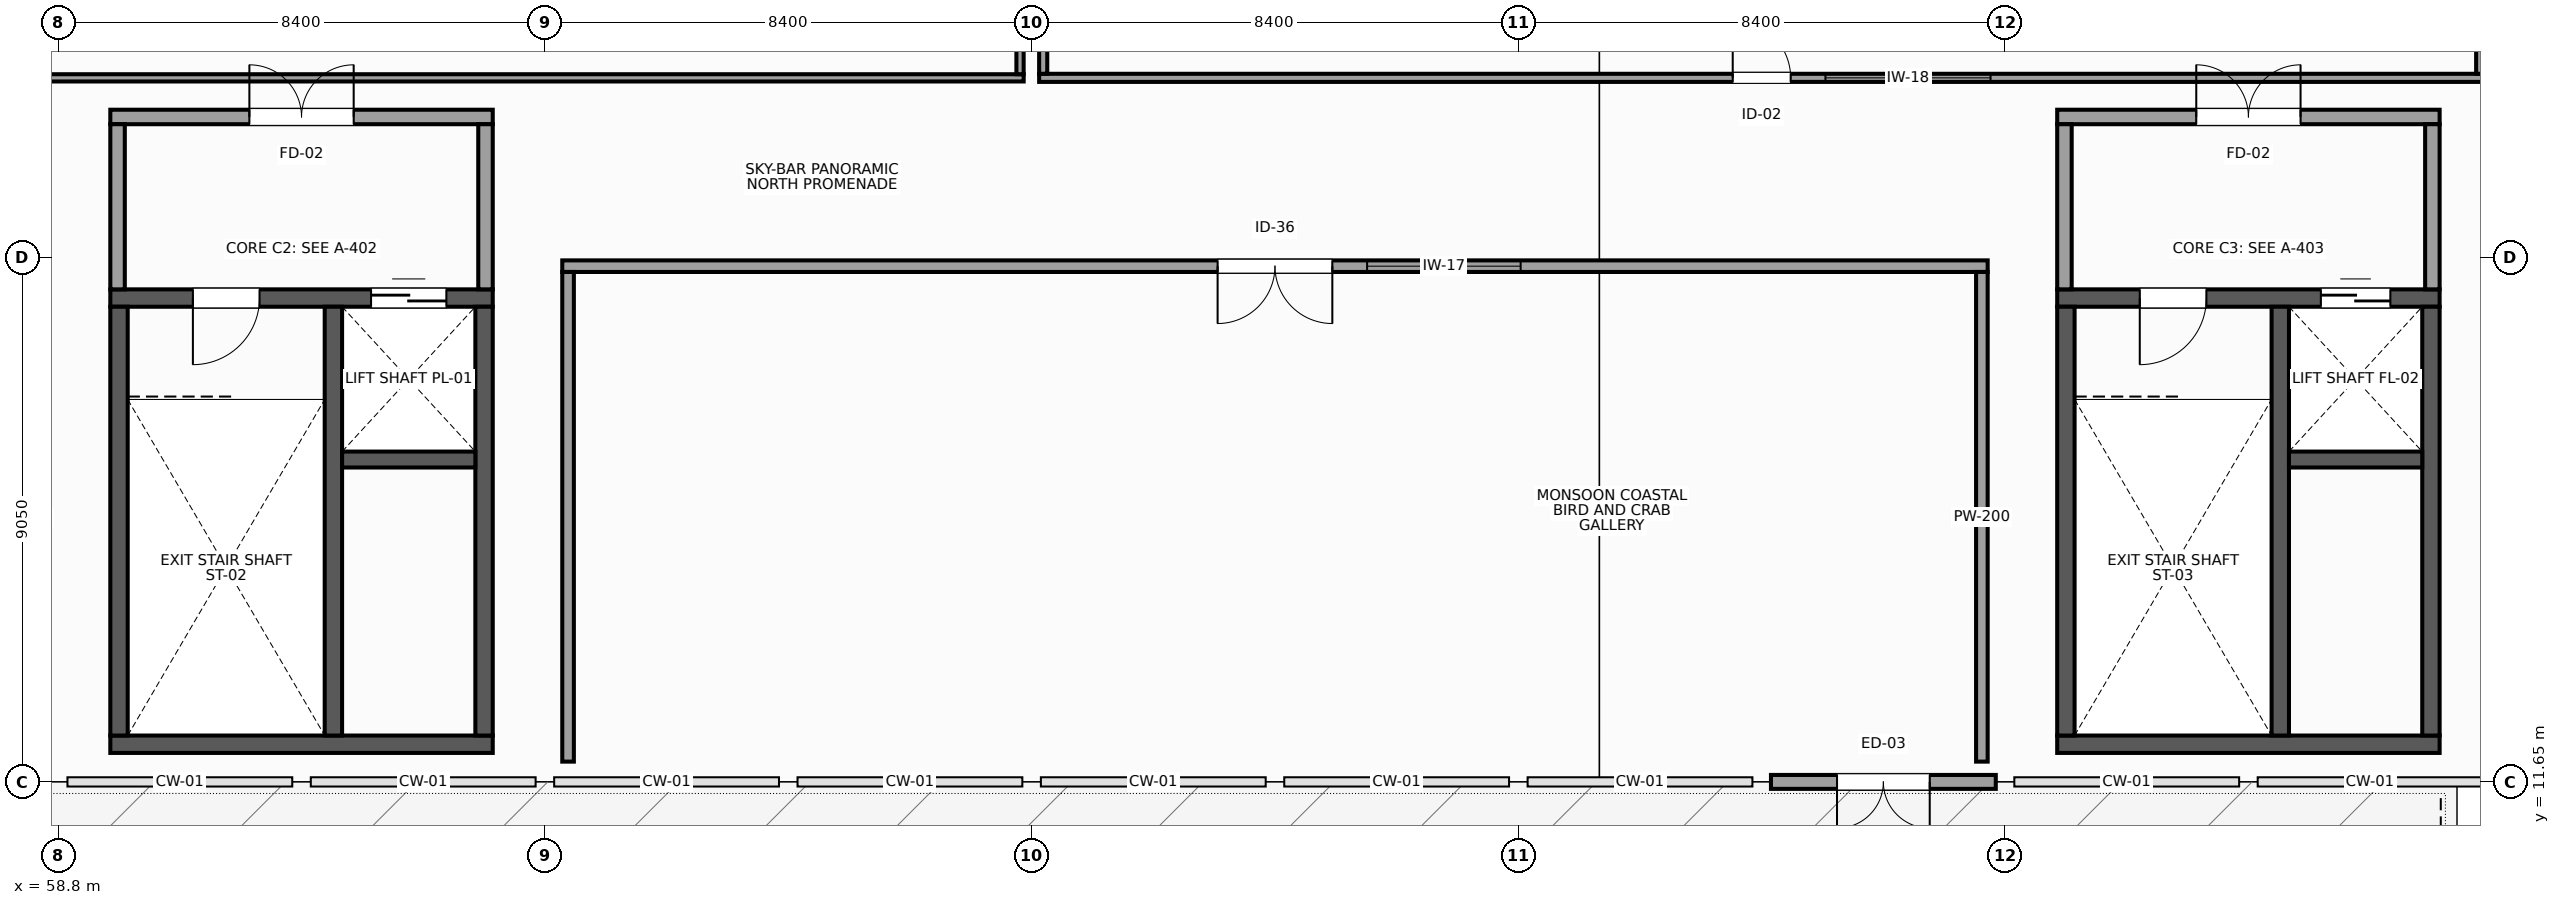
"""IFC4 building model, lengths in metres.
Left out: names, types, materials, properties, quantities, classifications, styles, units other than length and angle.
Written with IfcOpenShell. Run it as: python <this file> out.ifc"""

import sys

from ifc_helpers import new_model, si_unit, direction, frame, frame_2d, origin, origin_2d, place, context, subcontext, project, spatial, rectangle, extrude, element, fill, save


model = new_model("IFC4")
c1 = context("Model", 3, precision=1e-05, world=origin(), true_north=direction((0.0, 1.0)))
c2 = subcontext(c1, "Body", "Model", "MODEL_VIEW")
j1 = project(units=[si_unit("LENGTHUNIT", "METRE"), si_unit("PLANEANGLEUNIT", "RADIAN")], contexts=[c1])
p1 = place(None, origin())
s1 = spatial("IfcSite", under=j1, at=p1, CompositionType="ELEMENT")
p2 = place(p1, origin())
s2 = spatial("IfcBuilding", under=s1, at=p2, CompositionType="ELEMENT")
p3 = place(p2, frame((0.0, 0.0, 24.6)))
s3 = spatial("IfcBuildingStorey", under=s2, at=p3, CompositionType="ELEMENT", Elevation=24.6)
p4 = place(p3, frame((88.36, 11.65, 0.0), z_axis=(0.0, 0.0, 1.0), x_axis=(1.0, 0.0, 0.0)))
e1 = element("IfcWall", 1, at=p4, inside=s3, PredefinedType="STANDARD", context=c2, shape_type="SweptSolid", body=[
    extrude(rectangle(XDim=3.88, YDim=0.24, at=frame_2d((1.94, 0.0))), origin(), (0.0, 0.0, 1.0), 4.78),
])
p5 = place(p4, frame((1.14, 0.0, 0.0)))
e2 = element("IfcOpeningElement", 2, at=p5, cuts=e1, PredefinedType="OPENING", context=c2, shape_type="SweptSolid", body=[
    extrude(rectangle(XDim=1.6, YDim=2.25, at=frame_2d((0.8, 1.125))), frame((0.0, 0.13, 0.0), z_axis=(0.0, -1.0, 0.0), x_axis=(1.0, 0.0, 0.0)), (0.0, 0.0, 1.0), 0.26),
])
p6 = place(p3, frame((59.7, 12.3, 0.0), z_axis=(0.0, 0.0, 1.0), x_axis=(1.0, 0.0, 0.0)))
e3 = element("IfcWall", 3, at=p6, inside=s3, PredefinedType="SHEAR", context=c2, shape_type="SweptSolid", body=[
    extrude(rectangle(XDim=6.6, YDim=0.3, at=frame_2d((3.3, 0.0))), origin(), (0.0, 0.0, 1.0), 5.18),
])
p7 = place(p3, frame((59.7, 20.0, 0.0), z_axis=(0.0, 0.0, 1.0), x_axis=(1.0, 0.0, 0.0)))
e4 = element("IfcWall", 4, at=p7, inside=s3, PredefinedType="SHEAR", context=c2, shape_type="SweptSolid", body=[
    extrude(rectangle(XDim=6.6, YDim=0.3, at=frame_2d((3.3, 0.0))), origin(), (0.0, 0.0, 1.0), 5.18),
])
p8 = place(p7, frame((1.425, 0.0, 0.0)))
e5 = element("IfcOpeningElement", 5, at=p8, cuts=e4, PredefinedType="OPENING", context=c2, shape_type="SweptSolid", body=[
    extrude(rectangle(XDim=1.15, YDim=2.2, at=frame_2d((0.575, 1.1))), frame((0.0, 0.16, 0.0), z_axis=(0.0, -1.0, 0.0), x_axis=(1.0, 0.0, 0.0)), (0.0, 0.0, 1.0), 0.32),
])
p9 = place(p7, frame((4.5, 0.0, 0.0)))
e6 = element("IfcOpeningElement", 6, at=p9, cuts=e4, PredefinedType="OPENING", context=c2, shape_type="SweptSolid", body=[
    extrude(rectangle(XDim=1.3, YDim=2.2, at=frame_2d((0.65, 1.1))), frame((0.0, 0.16, 0.0), z_axis=(0.0, -1.0, 0.0), x_axis=(1.0, 0.0, 0.0)), (0.0, 0.0, 1.0), 0.32),
])
for number, where, z_axis, x_axis in (
    (7, (59.85, 12.45, 0.0), (0.0, 0.0, 1.0), (0.0, 1.0, 0.0)),
    (8, (66.15, 12.45, 0.0), (0.0, 0.0, 1.0), (0.0, 1.0, 0.0)),
    (9, (63.55, 12.45, 0.0), (0.0, 0.0, 1.0), (0.0, 1.0, 0.0)),
):
    element("IfcWall", number, at=place(p3, frame(where, z_axis=z_axis, x_axis=x_axis)), inside=s3, PredefinedType="SHEAR", context=c2, shape_type="SweptSolid", body=[
        extrude(rectangle(XDim=7.4, YDim=0.3, at=frame_2d((3.7, 0.0))), origin(), (0.0, 0.0, 1.0), 5.18),
    ])
p10 = place(p3, frame((63.7, 17.213, 0.0), z_axis=(0.0, 0.0, 1.0), x_axis=(1.0, 0.0, 0.0)))
e10 = element("IfcWall", 10, at=p10, inside=s3, PredefinedType="SHEAR", context=c2, shape_type="SweptSolid", body=[
    extrude(rectangle(XDim=2.3, YDim=0.275, at=frame_2d((1.15, 0.0))), origin(), (0.0, 0.0, 1.0), 5.18),
])
p11 = place(p3, frame((59.7, 23.125, 0.0), z_axis=(0.0, 0.0, 1.0), x_axis=(1.0, 0.0, 0.0)))
e11 = element("IfcWall", 11, at=p11, inside=s3, PredefinedType="PARTITIONING", context=c2, shape_type="SweptSolid", body=[
    extrude(rectangle(XDim=6.6, YDim=0.25, at=frame_2d((3.3, 0.0))), origin(), (0.0, 0.0, 1.0), 4.568),
])
p12 = place(p11, frame((2.4, 0.0, 0.0)))
e12 = element("IfcOpeningElement", 12, at=p12, cuts=e11, PredefinedType="OPENING", context=c2, shape_type="SweptSolid", body=[
    extrude(rectangle(XDim=1.8, YDim=2.25, at=frame_2d((0.9, 1.125))), frame((0.0, 0.135, 0.0), z_axis=(0.0, -1.0, 0.0), x_axis=(1.0, 0.0, 0.0)), (0.0, 0.0, 1.0), 0.27),
])
for number, where, z_axis, x_axis in (
    (13, (59.825, 20.15, 0.0), (0.0, 0.0, 1.0), (0.0, 1.0, 0.0)),
    (14, (66.175, 20.15, 0.0), (0.0, 0.0, 1.0), (0.0, 1.0, 0.0)),
):
    element("IfcWall", number, at=place(p3, frame(where, z_axis=z_axis, x_axis=x_axis)), inside=s3, PredefinedType="PARTITIONING", context=c2, shape_type="SweptSolid", body=[
        extrude(rectangle(XDim=2.85, YDim=0.25, at=frame_2d((1.425, 0.0))), origin(), (0.0, 0.0, 1.0), 4.94),
    ])
p13 = place(p3, frame((93.3, 12.3, 0.0), z_axis=(0.0, 0.0, 1.0), x_axis=(1.0, 0.0, 0.0)))
e15 = element("IfcWall", 15, at=p13, inside=s3, PredefinedType="SHEAR", context=c2, shape_type="SweptSolid", body=[
    extrude(rectangle(XDim=6.6, YDim=0.3, at=frame_2d((3.3, 0.0))), origin(), (0.0, 0.0, 1.0), 5.18),
])
p14 = place(p3, frame((93.3, 20.0, 0.0), z_axis=(0.0, 0.0, 1.0), x_axis=(1.0, 0.0, 0.0)))
e16 = element("IfcWall", 16, at=p14, inside=s3, PredefinedType="SHEAR", context=c2, shape_type="SweptSolid", body=[
    extrude(rectangle(XDim=6.6, YDim=0.3, at=frame_2d((3.3, 0.0))), origin(), (0.0, 0.0, 1.0), 5.18),
])
p15 = place(p14, frame((1.425, 0.0, 0.0)))
e17 = element("IfcOpeningElement", 17, at=p15, cuts=e16, PredefinedType="OPENING", context=c2, shape_type="SweptSolid", body=[
    extrude(rectangle(XDim=1.15, YDim=2.2, at=frame_2d((0.575, 1.1))), frame((0.0, 0.16, 0.0), z_axis=(0.0, -1.0, 0.0), x_axis=(1.0, 0.0, 0.0)), (0.0, 0.0, 1.0), 0.32),
])
p16 = place(p14, frame((4.55, 0.0, 0.0)))
e18 = element("IfcOpeningElement", 18, at=p16, cuts=e16, PredefinedType="OPENING", context=c2, shape_type="SweptSolid", body=[
    extrude(rectangle(XDim=1.2, YDim=2.15, at=frame_2d((0.6, 1.075))), frame((0.0, 0.16, 0.0), z_axis=(0.0, -1.0, 0.0), x_axis=(1.0, 0.0, 0.0)), (0.0, 0.0, 1.0), 0.32),
])
for number, where, z_axis, x_axis in (
    (19, (93.45, 12.45, 0.0), (0.0, 0.0, 1.0), (0.0, 1.0, 0.0)),
    (20, (99.75, 12.45, 0.0), (0.0, 0.0, 1.0), (0.0, 1.0, 0.0)),
    (21, (97.15, 12.45, 0.0), (0.0, 0.0, 1.0), (0.0, 1.0, 0.0)),
):
    element("IfcWall", number, at=place(p3, frame(where, z_axis=z_axis, x_axis=x_axis)), inside=s3, PredefinedType="SHEAR", context=c2, shape_type="SweptSolid", body=[
        extrude(rectangle(XDim=7.4, YDim=0.3, at=frame_2d((3.7, 0.0))), origin(), (0.0, 0.0, 1.0), 5.18),
    ])
p17 = place(p3, frame((97.3, 17.213, 0.0), z_axis=(0.0, 0.0, 1.0), x_axis=(1.0, 0.0, 0.0)))
e22 = element("IfcWall", 22, at=p17, inside=s3, PredefinedType="SHEAR", context=c2, shape_type="SweptSolid", body=[
    extrude(rectangle(XDim=2.3, YDim=0.275, at=frame_2d((1.15, 0.0))), origin(), (0.0, 0.0, 1.0), 5.18),
])
p18 = place(p3, frame((93.3, 23.125, 0.0), z_axis=(0.0, 0.0, 1.0), x_axis=(1.0, 0.0, 0.0)))
e23 = element("IfcWall", 23, at=p18, inside=s3, PredefinedType="PARTITIONING", context=c2, shape_type="SweptSolid", body=[
    extrude(rectangle(XDim=6.6, YDim=0.25, at=frame_2d((3.3, 0.0))), origin(), (0.0, 0.0, 1.0), 4.568),
])
p19 = place(p18, frame((2.4, 0.0, 0.0)))
e24 = element("IfcOpeningElement", 24, at=p19, cuts=e23, PredefinedType="OPENING", context=c2, shape_type="SweptSolid", body=[
    extrude(rectangle(XDim=1.8, YDim=2.25, at=frame_2d((0.9, 1.125))), frame((0.0, 0.135, 0.0), z_axis=(0.0, -1.0, 0.0), x_axis=(1.0, 0.0, 0.0)), (0.0, 0.0, 1.0), 0.27),
])
for number, where, z_axis, x_axis in (
    (25, (93.425, 20.15, 0.0), (0.0, 0.0, 1.0), (0.0, 1.0, 0.0)),
    (26, (99.775, 20.15, 0.0), (0.0, 0.0, 1.0), (0.0, 1.0, 0.0)),
):
    element("IfcWall", number, at=place(p3, frame(where, z_axis=z_axis, x_axis=x_axis)), inside=s3, PredefinedType="PARTITIONING", context=c2, shape_type="SweptSolid", body=[
        extrude(rectangle(XDim=2.85, YDim=0.25, at=frame_2d((1.425, 0.0))), origin(), (0.0, 0.0, 1.0), 4.94),
    ])
p20 = place(p3, frame((33.938, 23.8, 0.0), z_axis=(0.0, 0.0, 1.0), x_axis=(1.0, 0.0, 0.0)))
e27 = element("IfcWall", 27, at=p20, inside=s3, PredefinedType="PARTITIONING", context=c2, shape_type="SweptSolid", body=[
    extrude(rectangle(XDim=41.525, YDim=0.125, at=frame_2d((20.762, 0.0))), origin(), (0.0, 0.0, 1.0), 4.568),
])
p21 = place(p20, frame((19.822, 0.0, 0.0)))
e28 = element("IfcOpeningElement", 28, at=p21, cuts=e27, PredefinedType="OPENING", context=c2, shape_type="SweptSolid", body=[
    extrude(rectangle(XDim=1.88, YDim=2.42, at=frame_2d((0.94, 1.21))), frame((0.0, 0.073, 0.0), z_axis=(0.0, -1.0, 0.0), x_axis=(1.0, 0.0, 0.0)), (0.0, 0.0, 1.0), 0.145),
])
p22 = place(p20, frame((22.302, 0.0, 1.05)))
e29 = element("IfcOpeningElement", 29, at=p22, cuts=e27, PredefinedType="OPENING", context=c2, shape_type="SweptSolid", body=[
    extrude(rectangle(XDim=2.35, YDim=1.48, at=frame_2d((1.175, 0.74))), frame((0.0, 0.073, 0.0), z_axis=(0.0, -1.0, 0.0), x_axis=(1.0, 0.0, 0.0)), (0.0, 0.0, 1.0), 0.145),
])
p23 = place(p3, frame((75.4, 23.863, 0.0), z_axis=(0.0, 0.0, 1.0), x_axis=(0.0, 1.0, 0.0)))
e30 = element("IfcWall", 30, at=p23, inside=s3, PredefinedType="PARTITIONING", context=c2, shape_type="SweptSolid", body=[
    extrude(rectangle(XDim=5.575, YDim=0.125, at=frame_2d((2.788, 0.0))), origin(), (0.0, 0.0, 1.0), 4.568),
])
p24 = place(p3, frame((67.5, 20.55, 0.0), z_axis=(0.0, 0.0, 1.0), x_axis=(1.0, 0.0, 0.0)))
e31 = element("IfcWall", 31, at=p24, inside=s3, PredefinedType="PARTITIONING", context=c2, shape_type="SweptSolid", body=[
    extrude(rectangle(XDim=24.6, YDim=0.2, at=frame_2d((12.3, 0.0))), origin(), (0.0, 0.0, 1.0), 4.568),
])
p25 = place(p24, frame((11.31, 0.0, 0.0)))
e32 = element("IfcOpeningElement", 32, at=p25, cuts=e31, PredefinedType="OPENING", context=c2, shape_type="SweptSolid", body=[
    extrude(rectangle(XDim=1.98, YDim=2.46, at=frame_2d((0.99, 1.23))), frame((0.0, 0.11, 0.0), z_axis=(0.0, -1.0, 0.0), x_axis=(1.0, 0.0, 0.0)), (0.0, 0.0, 1.0), 0.22),
])
p26 = place(p24, frame((13.89, 0.0, 1.05)))
e33 = element("IfcOpeningElement", 33, at=p26, cuts=e31, PredefinedType="OPENING", context=c2, shape_type="SweptSolid", body=[
    extrude(rectangle(XDim=2.65, YDim=1.28, at=frame_2d((1.325, 0.64))), frame((0.0, 0.11, 0.0), z_axis=(0.0, -1.0, 0.0), x_axis=(1.0, 0.0, 0.0)), (0.0, 0.0, 1.0), 0.22),
])
for number, where, z_axis, x_axis in (
    (34, (92.0, 12.0, 0.0), (0.0, 0.0, 1.0), (0.0, 1.0, 0.0)),
    (35, (67.6, 12.0, 0.0), (0.0, 0.0, 1.0), (0.0, 1.0, 0.0)),
):
    element("IfcWall", number, at=place(p3, frame(where, z_axis=z_axis, x_axis=x_axis)), inside=s3, PredefinedType="PARTITIONING", context=c2, shape_type="SweptSolid", body=[
        extrude(rectangle(XDim=8.45, YDim=0.2, at=frame_2d((4.225, 0.0))), origin(), (0.0, 0.0, 1.0), 4.94),
    ])
p27 = place(p3, frame((75.73, 23.8, 0.0), z_axis=(0.0, 0.0, 1.0), x_axis=(1.0, 0.0, 0.0)))
e36 = element("IfcWall", 36, at=p27, inside=s3, PredefinedType="PARTITIONING", context=c2, shape_type="SweptSolid", body=[
    extrude(rectangle(XDim=24.94, YDim=0.14, at=frame_2d((12.47, 0.0))), origin(), (0.0, 0.0, 1.0), 4.568),
])
p28 = place(p27, frame((11.97, 0.0, 0.0)))
e37 = element("IfcOpeningElement", 37, at=p28, cuts=e36, PredefinedType="OPENING", context=c2, shape_type="SweptSolid", body=[
    extrude(rectangle(XDim=1.0, YDim=2.15, at=frame_2d((0.5, 1.075))), frame((0.0, 0.08, 0.0), z_axis=(0.0, -1.0, 0.0), x_axis=(1.0, 0.0, 0.0)), (0.0, 0.0, 1.0), 0.16),
])
p29 = place(p27, frame((13.57, 0.0, 1.05)))
e38 = element("IfcOpeningElement", 38, at=p29, cuts=e36, PredefinedType="OPENING", context=c2, shape_type="SweptSolid", body=[
    extrude(rectangle(XDim=2.85, YDim=1.52, at=frame_2d((1.425, 0.76))), frame((0.0, 0.08, 0.0), z_axis=(0.0, -1.0, 0.0), x_axis=(1.0, 0.0, 0.0)), (0.0, 0.0, 1.0), 0.16),
])
for number, where, z_axis, x_axis in (
    (39, (100.6, 23.87, 0.0), (0.0, 0.0, 1.0), (0.0, 1.0, 0.0)),
    (40, (75.8, 23.87, 0.0), (0.0, 0.0, 1.0), (0.0, 1.0, 0.0)),
):
    element("IfcWall", number, at=place(p3, frame(where, z_axis=z_axis, x_axis=x_axis)), inside=s3, PredefinedType="PARTITIONING", context=c2, shape_type="SweptSolid", body=[
        extrude(rectangle(XDim=5.56, YDim=0.14, at=frame_2d((2.78, 0.0))), origin(), (0.0, 0.0, 1.0), 4.568),
    ])
p30 = place(p5, frame((1.6, 0.0, 0.0), z_axis=(0.0, 0.0, 1.0), x_axis=(-1.0, 0.0, 0.0)))
e41 = element("IfcDoor", 41, at=p30, inside=s3, OperationType="DOUBLE_DOOR_SINGLE_SWING", PredefinedType="DOOR", context=c2, shape_type="SweptSolid", body=[
    extrude(rectangle(XDim=1.6, YDim=2.25, at=frame_2d((0.8, 1.125))), frame((0.0, 0.025, 0.0), z_axis=(0.0, -1.0, 0.0), x_axis=(1.0, 0.0, 0.0)), (0.0, 0.0, 1.0), 0.05),
])
fill(e2, e41)
p31 = place(p2, frame((0.0, 0.0, 30.0)))
p32 = place(p31, frame((0.0, 0.0, -0.22)))
p33 = place(p32, frame((61.6, 25.2, -0.01), z_axis=(0.0, 0.0, 1.0), x_axis=(1.0, 0.0, 0.0)))
p34 = place(p33, frame((0.0, 0.0, 0.05)))
e42 = element("IfcWindow", 42, at=p34, inside=s3, PartitioningType="SINGLE_PANEL", PredefinedType="SKYLIGHT", context=c2, shape_type="SweptSolid", body=[
    extrude(rectangle(XDim=3.0, YDim=2.4, at=origin_2d()), origin(), (0.0, 0.0, 1.0), 0.18),
])
p35 = place(p31, frame((0.0, 0.0, -0.22)))
p36 = place(p35, frame((72.4, 24.8, -0.01), z_axis=(0.0, 0.0, 1.0), x_axis=(1.0, 0.0, 0.0)))
p37 = place(p36, frame((0.0, 0.0, 0.05)))
e43 = element("IfcWindow", 43, at=p37, inside=s3, PartitioningType="SINGLE_PANEL", PredefinedType="SKYLIGHT", context=c2, shape_type="SweptSolid", body=[
    extrude(rectangle(XDim=2.4, YDim=2.4, at=origin_2d()), origin(), (0.0, 0.0, 1.0), 0.18),
])
p38 = place(p35, frame((79.8, 25.2, -0.01), z_axis=(0.0, 0.0, 1.0), x_axis=(1.0, 0.0, 0.0)))
p39 = place(p38, frame((0.0, 0.0, 0.05)))
e44 = element("IfcWindow", 44, at=p39, inside=s3, PartitioningType="SINGLE_PANEL", PredefinedType="SKYLIGHT", context=c2, shape_type="SweptSolid", body=[
    extrude(rectangle(XDim=3.0, YDim=2.4, at=origin_2d()), origin(), (0.0, 0.0, 1.0), 0.18),
])
p40 = place(p31, frame((0.0, 0.0, -0.22)))
p41 = place(p40, frame((90.6, 24.8, -0.01), z_axis=(0.0, 0.0, 1.0), x_axis=(1.0, 0.0, 0.0)))
p42 = place(p41, frame((0.0, 0.0, 0.05)))
e45 = element("IfcWindow", 45, at=p42, inside=s3, PartitioningType="SINGLE_PANEL", PredefinedType="SKYLIGHT", context=c2, shape_type="SweptSolid", body=[
    extrude(rectangle(XDim=2.4, YDim=2.4, at=origin_2d()), origin(), (0.0, 0.0, 1.0), 0.18),
])
p43 = place(p40, frame((98.0, 25.2, -0.01), z_axis=(0.0, 0.0, 1.0), x_axis=(1.0, 0.0, 0.0)))
p44 = place(p43, frame((0.0, 0.0, 0.05)))
e46 = element("IfcWindow", 46, at=p44, inside=s3, PartitioningType="SINGLE_PANEL", PredefinedType="SKYLIGHT", context=c2, shape_type="SweptSolid", body=[
    extrude(rectangle(XDim=3.0, YDim=2.4, at=origin_2d()), origin(), (0.0, 0.0, 1.0), 0.18),
])
p45 = place(p8, frame((1.15, 0.0, 0.0), z_axis=(0.0, 0.0, 1.0), x_axis=(-1.0, 0.0, 0.0)))
e47 = element("IfcDoor", 47, at=p45, inside=s3, OperationType="SINGLE_SWING_RIGHT", PredefinedType="DOOR", context=c2, shape_type="SweptSolid", body=[
    extrude(rectangle(XDim=1.15, YDim=2.2, at=frame_2d((0.575, 1.1))), frame((0.0, 0.025, 0.0), z_axis=(0.0, -1.0, 0.0), x_axis=(1.0, 0.0, 0.0)), (0.0, 0.0, 1.0), 0.05),
])
fill(e5, e47)
p46 = place(p9, origin())
e48 = element("IfcDoor", 48, at=p46, inside=s3, OperationType="DOUBLE_DOOR_SLIDING", PredefinedType="DOOR", context=c2, shape_type="SweptSolid", body=[
    extrude(rectangle(XDim=1.3, YDim=2.2, at=frame_2d((0.65, 1.1))), frame((0.0, 0.025, 0.0), z_axis=(0.0, -1.0, 0.0), x_axis=(1.0, 0.0, 0.0)), (0.0, 0.0, 1.0), 0.05),
])
fill(e6, e48)
p47 = place(p12, origin())
e49 = element("IfcDoor", 49, at=p47, inside=s3, OperationType="DOUBLE_DOOR_SINGLE_SWING", PredefinedType="DOOR", context=c2, shape_type="SweptSolid", body=[
    extrude(rectangle(XDim=1.8, YDim=2.25, at=frame_2d((0.9, 1.125))), frame((0.0, 0.025, 0.0), z_axis=(0.0, -1.0, 0.0), x_axis=(1.0, 0.0, 0.0)), (0.0, 0.0, 1.0), 0.05),
])
fill(e12, e49)
p48 = place(p15, frame((1.15, 0.0, 0.0), z_axis=(0.0, 0.0, 1.0), x_axis=(-1.0, 0.0, 0.0)))
e50 = element("IfcDoor", 50, at=p48, inside=s3, OperationType="SINGLE_SWING_RIGHT", PredefinedType="DOOR", context=c2, shape_type="SweptSolid", body=[
    extrude(rectangle(XDim=1.15, YDim=2.2, at=frame_2d((0.575, 1.1))), frame((0.0, 0.025, 0.0), z_axis=(0.0, -1.0, 0.0), x_axis=(1.0, 0.0, 0.0)), (0.0, 0.0, 1.0), 0.05),
])
fill(e17, e50)
p49 = place(p16, origin())
e51 = element("IfcDoor", 51, at=p49, inside=s3, OperationType="DOUBLE_DOOR_SLIDING", PredefinedType="DOOR", context=c2, shape_type="SweptSolid", body=[
    extrude(rectangle(XDim=1.2, YDim=2.15, at=frame_2d((0.6, 1.075))), frame((0.0, 0.025, 0.0), z_axis=(0.0, -1.0, 0.0), x_axis=(1.0, 0.0, 0.0)), (0.0, 0.0, 1.0), 0.05),
])
fill(e18, e51)
p50 = place(p19, origin())
e52 = element("IfcDoor", 52, at=p50, inside=s3, OperationType="DOUBLE_DOOR_SINGLE_SWING", PredefinedType="DOOR", context=c2, shape_type="SweptSolid", body=[
    extrude(rectangle(XDim=1.8, YDim=2.25, at=frame_2d((0.9, 1.125))), frame((0.0, 0.025, 0.0), z_axis=(0.0, -1.0, 0.0), x_axis=(1.0, 0.0, 0.0)), (0.0, 0.0, 1.0), 0.05),
])
fill(e24, e52)
p51 = place(p25, frame((1.98, 0.0, 0.0), z_axis=(0.0, 0.0, 1.0), x_axis=(-1.0, 0.0, 0.0)))
e53 = element("IfcDoor", 53, at=p51, inside=s3, OperationType="DOUBLE_DOOR_SINGLE_SWING", PredefinedType="DOOR", context=c2, shape_type="SweptSolid", body=[
    extrude(rectangle(XDim=1.98, YDim=2.46, at=frame_2d((0.99, 1.23))), frame((0.0, 0.025, 0.0), z_axis=(0.0, -1.0, 0.0), x_axis=(1.0, 0.0, 0.0)), (0.0, 0.0, 1.0), 0.05),
])
fill(e32, e53)
p52 = place(p26, origin())
e54 = element("IfcWindow", 54, at=p52, inside=s3, PartitioningType="SINGLE_PANEL", PredefinedType="WINDOW", context=c2, shape_type="SweptSolid", body=[
    extrude(rectangle(XDim=2.65, YDim=1.28, at=frame_2d((1.325, 0.64))), frame((0.0, 0.03, 0.0), z_axis=(0.0, -1.0, 0.0), x_axis=(1.0, 0.0, 0.0)), (0.0, 0.0, 1.0), 0.06),
])
fill(e33, e54)
p53 = place(p28, origin())
e55 = element("IfcDoor", 55, at=p53, inside=s3, OperationType="SINGLE_SWING_LEFT", PredefinedType="DOOR", context=c2, shape_type="SweptSolid", body=[
    extrude(rectangle(XDim=1.0, YDim=2.15, at=frame_2d((0.5, 1.075))), frame((0.0, 0.025, 0.0), z_axis=(0.0, -1.0, 0.0), x_axis=(1.0, 0.0, 0.0)), (0.0, 0.0, 1.0), 0.05),
])
fill(e37, e55)
p54 = place(p29, origin())
e56 = element("IfcWindow", 56, at=p54, inside=s3, PartitioningType="SINGLE_PANEL", PredefinedType="WINDOW", context=c2, shape_type="SweptSolid", body=[
    extrude(rectangle(XDim=2.85, YDim=1.52, at=frame_2d((1.425, 0.76))), frame((0.0, 0.03, 0.0), z_axis=(0.0, -1.0, 0.0), x_axis=(1.0, 0.0, 0.0)), (0.0, 0.0, 1.0), 0.06),
])
fill(e38, e56)
save(model, sys.argv[1])
